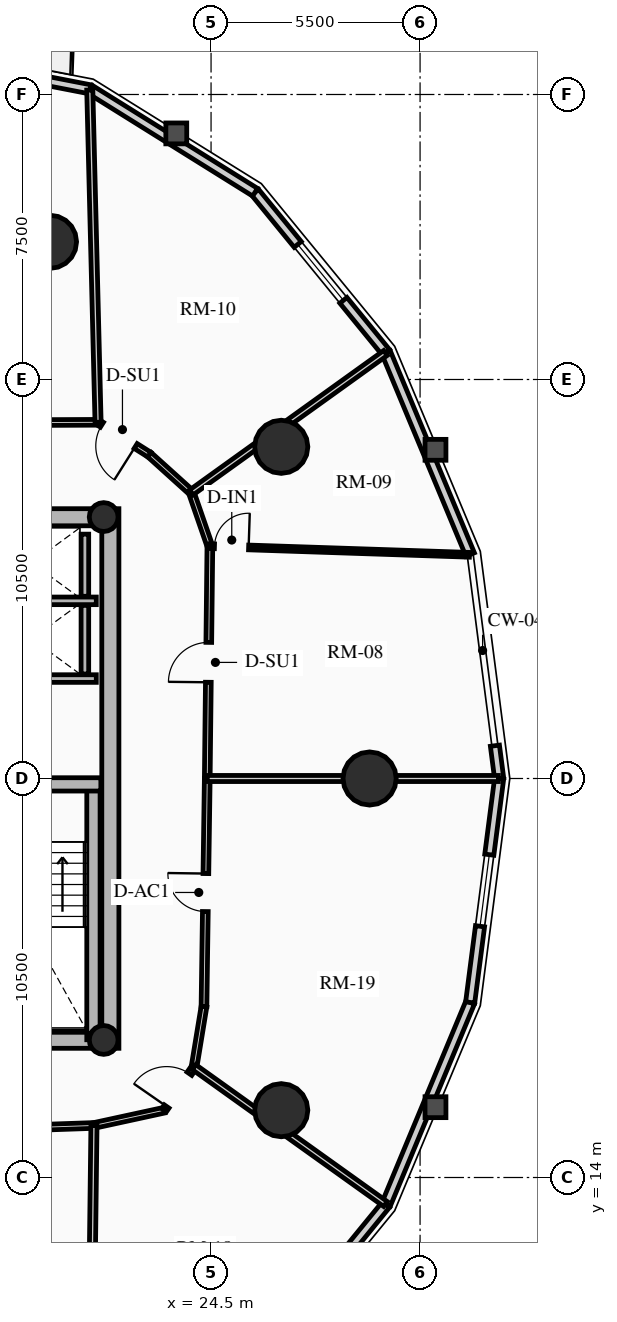
"""IFC4 building model, lengths in metres.
Left out: names, types, materials, properties, quantities, classifications, styles, units other than length and angle.
Written with IfcOpenShell. Run it as: python <this file> out.ifc"""

import sys

from ifc_helpers import new_model, si_unit, direction, frame, frame_2d, origin, origin_2d, place, context, subcontext, project, spatial, rectangle, circle, hollow_circle, extrude, source, transform, mapped, element, fill, save


model = new_model("IFC4")
c1 = context("Model", 3, precision=1e-05, world=origin(), true_north=direction((0.0, 1.0)))
c2 = subcontext(c1, "Body", "Model", "MODEL_VIEW")
j1 = project(units=[si_unit("LENGTHUNIT", "METRE"), si_unit("PLANEANGLEUNIT", "RADIAN")], contexts=[c1])
p1 = place(None, origin())
s1 = spatial("IfcSite", under=j1, at=p1, CompositionType="ELEMENT")
p2 = place(p1, origin())
s2 = spatial("IfcBuilding", under=s1, at=p2, CompositionType="ELEMENT")
p3 = place(p2, frame((0.0, 0.0, 78.88)))
s3 = spatial("IfcBuildingStorey", under=s2, at=p3, CompositionType="ELEMENT", Elevation=78.88)
p4 = place(p3, frame((21.85, 17.4, 0.0), z_axis=(0.0, 0.0, 1.0), x_axis=(0.0, 1.0, 0.0)))
e1 = element("IfcWall", 1, at=p4, inside=s3, PredefinedType="SHEAR", context=c2, shape_type="SweptSolid", body=[
    extrude(rectangle(XDim=14.2, YDim=0.45, at=frame_2d((7.1, 0.0))), origin(), (0.0, 0.0, 1.0), 2.91),
])
p5 = place(p3, frame((11.15, 17.625, 0.0), z_axis=(0.0, 0.0, 1.0), x_axis=(1.0, 0.0, 0.0)))
e2 = element("IfcWall", 2, at=p5, inside=s3, PredefinedType="SHEAR", context=c2, shape_type="SweptSolid", body=[
    extrude(rectangle(XDim=10.7, YDim=0.45, at=frame_2d((5.35, 0.0))), origin(), (0.0, 0.0, 1.0), 2.91),
])
m1 = source(origin(), c2, "Body", "SweptSolid", [
    extrude(rectangle(XDim=1.5, YDim=2.02, at=frame_2d((0.75, 1.01))), frame((0.0, 0.235, 0.0), z_axis=(0.0, -1.0, 0.0), x_axis=(1.0, 0.0, 0.0)), (0.0, 0.0, 1.0), 0.47),
])
p6 = place(p5, frame((5.45, 0.0, 0.0)))
e3 = element("IfcOpeningElement", 3, at=p6, cuts=e2, PredefinedType="OPENING", context=c2, shape_type="MappedRepresentation", body=[
    mapped(m1, transform((0.0, 0.0, 0.0), x_axis=(1.0, 0.0, 0.0), y_axis=(0.0, 1.0, 0.0), z_axis=(0.0, 0.0, 1.0), scale=1.0)),
])
p7 = place(p3, frame((11.15, 31.375, 0.0), z_axis=(0.0, 0.0, 1.0), x_axis=(1.0, 0.0, 0.0)))
e4 = element("IfcWall", 4, at=p7, inside=s3, PredefinedType="SHEAR", context=c2, shape_type="SweptSolid", body=[
    extrude(rectangle(XDim=10.7, YDim=0.45, at=frame_2d((5.35, 0.0))), origin(), (0.0, 0.0, 1.0), 2.91),
])
p8 = place(p7, frame((4.6, 0.0, 0.0)))
e5 = element("IfcOpeningElement", 5, at=p8, cuts=e4, PredefinedType="OPENING", context=c2, shape_type="MappedRepresentation", body=[
    mapped(m1, transform((0.0, 0.0, 0.0), x_axis=(1.0, 0.0, 0.0), y_axis=(0.0, 1.0, 0.0), z_axis=(0.0, 0.0, 1.0), scale=1.0)),
])
p9 = place(p3, frame((21.405, 17.625, 0.0), z_axis=(0.0, 0.0, 1.0), x_axis=(0.0, 1.0, 0.0)))
e6 = element("IfcWall", 6, at=p9, inside=s3, PredefinedType="SHEAR", context=c2, shape_type="SweptSolid", body=[
    extrude(rectangle(XDim=6.72, YDim=0.35, at=frame_2d((3.36, 0.0))), origin(), (0.0, 0.0, 1.0), 2.91),
])
p10 = place(p3, frame((18.315, 24.345, 0.0), z_axis=(0.0, 0.0, 1.0), x_axis=(1.0, 0.0, 0.0)))
e7 = element("IfcWall", 7, at=p10, inside=s3, PredefinedType="SHEAR", context=c2, shape_type="SweptSolid", body=[
    extrude(rectangle(XDim=3.285, YDim=0.35, at=frame_2d((1.643, 0.0))), origin(), (0.0, 0.0, 1.0), 2.91),
])
for number, where, z_axis, x_axis in (
    (8, (21.675, 17.62, 0.0), (0.0, 0.0, 1.0), (1.0, 0.0, 0.0)),
    (9, (21.675, 31.38, 0.0), (0.0, 0.0, 1.0), (1.0, 0.0, 0.0)),
):
    element("IfcColumn", number, at=place(p3, frame(where, z_axis=z_axis, x_axis=x_axis)), inside=s3, PredefinedType="COLUMN", context=c2, shape_type="SweptSolid", body=[
        extrude(hollow_circle(Radius=0.38, WallThickness=0.032, at=origin_2d()), origin(), (0.0, 0.0, 1.0), 2.91),
    ])
for number, where, z_axis, x_axis in (
    (10, (28.672, 24.5, 0.0), (0.0, 0.0, 1.0), (1.0, 0.0, 0.0)),
    (11, (26.347, 33.229, 0.0), (0.0, 0.0, 1.0), (1.0, 0.0, 0.0)),
    (12, (20.261, 38.623, 0.0), (0.0, 0.0, 1.0), (1.0, 0.0, 0.0)),
    (13, (26.347, 15.771, 0.0), (0.0, 0.0, 1.0), (1.0, 0.0, 0.0)),
):
    element("IfcColumn", number, at=place(p3, frame(where, z_axis=z_axis, x_axis=x_axis)), inside=s3, PredefinedType="USERDEFINED", context=c2, shape_type="SweptSolid", body=[
        extrude(circle(Radius=0.7, at=origin_2d()), origin(), (0.0, 0.0, 1.0), 2.91),
    ])
p11 = place(p3, frame((31.969, 25.363, 0.0), z_axis=(0.0, 0.0, 1.0), x_axis=(0.128523364007, -0.991706481225, 0.0)))
e14 = element("IfcWall", 14, at=p11, inside=s3, PredefinedType="SOLIDWALL", context=c2, shape_type="SweptSolid", body=[
    extrude(rectangle(XDim=0.87, YDim=0.24, at=frame_2d((0.435, 0.0))), origin(), (0.0, 0.0, 1.0), 2.655),
])
p12 = place(p3, frame((29.105, 35.709, 0.0), z_axis=(0.0, 0.0, 1.0), x_axis=(0.384344417632, -0.923189779317, 0.0)))
e15 = element("IfcWall", 15, at=p12, inside=s3, PredefinedType="SOLIDWALL", context=c2, shape_type="SweptSolid", body=[
    extrude(rectangle(XDim=5.758, YDim=0.24, at=frame_2d((2.879, 0.0))), origin(), (0.0, 0.0, 1.0), 2.179),
])
p13 = place(p3, frame((25.658, 39.928, 0.0), z_axis=(0.0, 0.0, 1.0), x_axis=(0.632700781152, -0.77439635945, 0.0)))
e16 = element("IfcWall", 16, at=p13, inside=s3, PredefinedType="SOLIDWALL", context=c2, shape_type="SweptSolid", body=[
    extrude(rectangle(XDim=5.448, YDim=0.24, at=frame_2d((2.724, 0.0))), origin(), (0.0, 0.0, 1.0), 2.179),
])
m2 = source(origin(), c2, "Body", "SweptSolid", [
    extrude(rectangle(XDim=1.9, YDim=1.35, at=frame_2d((0.95, 0.675))), frame((0.0, 0.13, 0.0), z_axis=(0.0, -1.0, 0.0), x_axis=(1.0, 0.0, 0.0)), (0.0, 0.0, 1.0), 0.26),
])
p14 = place(p13, frame((1.774, 0.0, 0.65)))
e17 = element("IfcOpeningElement", 17, at=p14, cuts=e16, PredefinedType="OPENING", context=c2, shape_type="MappedRepresentation", body=[
    mapped(m2, transform((0.0, 0.0, 0.0), x_axis=(1.0, 0.0, 0.0), y_axis=(0.0, 1.0, 0.0), z_axis=(0.0, 0.0, 1.0), scale=1.0)),
])
p15 = place(p3, frame((21.315, 42.637, 0.0), z_axis=(0.0, 0.0, 1.0), x_axis=(0.848520380187, -0.529162701263, 0.0)))
e18 = element("IfcWall", 18, at=p15, inside=s3, PredefinedType="SOLIDWALL", context=c2, shape_type="SweptSolid", body=[
    extrude(rectangle(XDim=5.119, YDim=0.24, at=frame_2d((2.56, 0.0))), origin(), (0.0, 0.0, 1.0), 2.179),
])
p16 = place(p3, frame((16.5, 43.57, 0.0), z_axis=(0.0, 0.0, 1.0), x_axis=(0.981723785992, -0.190311344954, 0.0)))
e19 = element("IfcWall", 19, at=p16, inside=s3, PredefinedType="SOLIDWALL", context=c2, shape_type="SweptSolid", body=[
    extrude(rectangle(XDim=4.904, YDim=0.24, at=frame_2d((2.452, 0.0))), origin(), (0.0, 0.0, 1.0), 2.179),
])
m3 = source(origin(), c2, "Body", "SweptSolid", [
    extrude(rectangle(XDim=1.15, YDim=2.005, at=frame_2d((0.575, 1.002))), frame((0.0, 0.13, 0.0), z_axis=(0.0, -1.0, 0.0), x_axis=(1.0, 0.0, 0.0)), (0.0, 0.0, 1.0), 0.26),
])
p17 = place(p16, frame((1.877, 0.0, 0.0)))
e20 = element("IfcOpeningElement", 20, at=p17, cuts=e19, PredefinedType="OPENING", context=c2, shape_type="MappedRepresentation", body=[
    mapped(m3, transform((0.0, 0.0, 0.0), x_axis=(1.0, 0.0, 0.0), y_axis=(0.0, 1.0, 0.0), z_axis=(0.0, 0.0, 1.0), scale=1.0)),
])
p18 = place(p3, frame((29.105, 13.291, 0.0), z_axis=(0.0, 0.0, 1.0), x_axis=(-0.632700781152, -0.77439635945, 0.0)))
e21 = element("IfcWall", 21, at=p18, inside=s3, PredefinedType="SOLIDWALL", context=c2, shape_type="SweptSolid", body=[
    extrude(rectangle(XDim=5.448, YDim=0.24, at=frame_2d((2.724, 0.0))), origin(), (0.0, 0.0, 1.0), 2.179),
])
p19 = place(p18, frame((1.774, 0.0, 0.65)))
e22 = element("IfcOpeningElement", 22, at=p19, cuts=e21, PredefinedType="OPENING", context=c2, shape_type="MappedRepresentation", body=[
    mapped(m2, transform((0.0, 0.0, 0.0), x_axis=(1.0, 0.0, 0.0), y_axis=(0.0, 1.0, 0.0), z_axis=(0.0, 0.0, 1.0), scale=1.0)),
])
p20 = place(p3, frame((31.318, 18.607, 0.0), z_axis=(0.0, 0.0, 1.0), x_axis=(-0.384344417632, -0.923189779317, 0.0)))
e23 = element("IfcWall", 23, at=p20, inside=s3, PredefinedType="SOLIDWALL", context=c2, shape_type="SweptSolid", body=[
    extrude(rectangle(XDim=5.758, YDim=0.24, at=frame_2d((2.879, 0.0))), origin(), (0.0, 0.0, 1.0), 2.179),
])
p21 = place(p3, frame((32.081, 24.5, 0.0), z_axis=(0.0, 0.0, 1.0), x_axis=(-0.128351991996, -0.991728675672, 0.0)))
e24 = element("IfcWall", 24, at=p21, inside=s3, PredefinedType="SOLIDWALL", context=c2, shape_type="SweptSolid", body=[
    extrude(rectangle(XDim=5.942, YDim=0.24, at=frame_2d((2.971, 0.0))), origin(), (0.0, 0.0, 1.0), 2.179),
])
p22 = place(p21, frame((2.021, 0.0, 0.65)))
e25 = element("IfcOpeningElement", 25, at=p22, cuts=e24, PredefinedType="OPENING", context=c2, shape_type="MappedRepresentation", body=[
    mapped(m2, transform((0.0, 0.0, 0.0), x_axis=(1.0, 0.0, 0.0), y_axis=(0.0, 1.0, 0.0), z_axis=(0.0, 0.0, 1.0), scale=1.0)),
])
for number, where, z_axis, x_axis in (
    (26, (18.51, 27.13, 0.0), (0.0, 0.0, 1.0), (1.0, 0.0, 0.0)),
    (27, (18.51, 29.175, 0.0), (0.0, 0.0, 1.0), (1.0, 0.0, 0.0)),
):
    element("IfcWall", number, at=place(p3, frame(where, z_axis=z_axis, x_axis=x_axis)), inside=s3, PredefinedType="SHEAR", context=c2, shape_type="SweptSolid", body=[
        extrude(rectangle(XDim=2.97, YDim=0.2, at=frame_2d((1.485, 0.0))), origin(), (0.0, 0.0, 1.0), 2.91),
    ])
p23 = place(p3, frame((21.18, 27.25, 0.0), z_axis=(0.0, 0.0, 1.0), x_axis=(0.0, 1.0, 0.0)))
e28 = element("IfcWall", 28, at=p23, inside=s3, PredefinedType="SHEAR", context=c2, shape_type="SweptSolid", body=[
    extrude(rectangle(XDim=1.805, YDim=0.2, at=frame_2d((0.902, 0.0))), origin(), (0.0, 0.0, 1.0), 2.91),
])
p24 = place(p3, frame((21.18, 29.295, 0.0), z_axis=(0.0, 0.0, 1.0), x_axis=(0.0, 1.0, 0.0)))
e29 = element("IfcWall", 29, at=p24, inside=s3, PredefinedType="SHEAR", context=c2, shape_type="SweptSolid", body=[
    extrude(rectangle(XDim=1.635, YDim=0.2, at=frame_2d((0.817, 0.0))), origin(), (0.0, 0.0, 1.0), 2.91),
])
p25 = place(p3, frame((24.4, 24.5, 0.0), z_axis=(0.0, 0.0, 1.0), x_axis=(0.011299841544, 0.999936154752, 0.0)))
e30 = element("IfcWall", 30, at=p25, inside=s3, PredefinedType="PARTITIONING", context=c2, shape_type="SweptSolid", body=[
    extrude(rectangle(XDim=6.115, YDim=0.15, at=frame_2d((3.057, 0.0))), origin(), (0.0, 0.0, 1.0), 2.225),
])
m4 = source(origin(), c2, "Body", "SweptSolid", [
    extrude(rectangle(XDim=1.05, YDim=2.015, at=frame_2d((0.525, 1.007))), frame((0.0, 0.085, 0.0), z_axis=(0.0, -1.0, 0.0), x_axis=(1.0, 0.0, 0.0)), (0.0, 0.0, 1.0), 0.17),
])
p26 = place(p25, frame((2.532, 0.0, 0.0)))
e31 = element("IfcOpeningElement", 31, at=p26, cuts=e30, PredefinedType="OPENING", context=c2, shape_type="MappedRepresentation", body=[
    mapped(m4, transform((0.0, 0.0, 0.0), x_axis=(1.0, 0.0, 0.0), y_axis=(0.0, 1.0, 0.0), z_axis=(0.0, 0.0, 1.0), scale=1.0)),
])
p27 = place(p3, frame((24.469, 30.614, 0.0), z_axis=(0.0, 0.0, 1.0), x_axis=(-0.327228335485, 0.944945298129, 0.0)))
e32 = element("IfcWall", 32, at=p27, inside=s3, PredefinedType="PARTITIONING", context=c2, shape_type="SweptSolid", body=[
    extrude(rectangle(XDim=1.495, YDim=0.15, at=frame_2d((0.748, 0.0))), origin(), (0.0, 0.0, 1.0), 2.225),
])
p28 = place(p3, frame((23.98, 32.027, 0.0), z_axis=(0.0, 0.0, 1.0), x_axis=(-0.742353224332, 0.670008724065, 0.0)))
e33 = element("IfcWall", 33, at=p28, inside=s3, PredefinedType="PARTITIONING", context=c2, shape_type="SweptSolid", body=[
    extrude(rectangle(XDim=1.485, YDim=0.15, at=frame_2d((0.742, 0.0))), origin(), (0.0, 0.0, 1.0), 2.225),
])
p29 = place(p3, frame((22.877, 33.022, 0.0), z_axis=(0.0, 0.0, 1.0), x_axis=(-0.845895608855, 0.533348496689, 0.0)))
e34 = element("IfcWall", 34, at=p29, inside=s3, PredefinedType="PARTITIONING", context=c2, shape_type="SweptSolid", body=[
    extrude(rectangle(XDim=1.597, YDim=0.15, at=frame_2d((0.798, 0.0))), origin(), (0.0, 0.0, 1.0), 2.225),
])
p30 = place(p29, frame((0.427, 0.0, 0.0)))
e35 = element("IfcOpeningElement", 35, at=p30, cuts=e34, PredefinedType="OPENING", context=c2, shape_type="MappedRepresentation", body=[
    mapped(m4, transform((0.0, 0.0, 0.0), x_axis=(1.0, 0.0, 0.0), y_axis=(0.0, 1.0, 0.0), z_axis=(0.0, 0.0, 1.0), scale=1.0)),
])
p31 = place(p3, frame((21.527, 33.873, 0.0), z_axis=(0.0, 0.0, 1.0), x_axis=(-0.999991838845, -0.004040079574, 0.0)))
e36 = element("IfcWall", 36, at=p31, inside=s3, PredefinedType="PARTITIONING", context=c2, shape_type="SweptSolid", body=[
    extrude(rectangle(XDim=3.384, YDim=0.15, at=frame_2d((1.692, 0.0))), origin(), (0.0, 0.0, 1.0), 2.225),
])
p32 = place(p3, frame((14.781, 15.141, 0.0), z_axis=(0.0, 0.0, 1.0), x_axis=(0.999407918707, 0.034406569513, 0.0)))
e37 = element("IfcWall", 37, at=p32, inside=s3, PredefinedType="PARTITIONING", context=c2, shape_type="SweptSolid", body=[
    extrude(rectangle(XDim=6.642, YDim=0.15, at=frame_2d((3.321, 0.0))), origin(), (0.0, 0.0, 1.0), 2.225),
])
p33 = place(p32, frame((2.796, 0.0, 0.0)))
e38 = element("IfcOpeningElement", 38, at=p33, cuts=e37, PredefinedType="OPENING", context=c2, shape_type="MappedRepresentation", body=[
    mapped(m4, transform((0.0, 0.0, 0.0), x_axis=(1.0, 0.0, 0.0), y_axis=(0.0, 1.0, 0.0), z_axis=(0.0, 0.0, 1.0), scale=1.0)),
])
p34 = place(p3, frame((21.419, 15.369, 0.0), z_axis=(0.0, 0.0, 1.0), x_axis=(0.977192701953, 0.212354475464, 0.0)))
e39 = element("IfcWall", 39, at=p34, inside=s3, PredefinedType="PARTITIONING", context=c2, shape_type="SweptSolid", body=[
    extrude(rectangle(XDim=1.888, YDim=0.15, at=frame_2d((0.944, 0.0))), origin(), (0.0, 0.0, 1.0), 2.225),
])
p35 = place(p3, frame((23.263, 15.77, 0.0), z_axis=(0.0, 0.0, 1.0), x_axis=(0.570743456919, 0.821128434768, 0.0)))
e40 = element("IfcWall", 40, at=p35, inside=s3, PredefinedType="PARTITIONING", context=c2, shape_type="SweptSolid", body=[
    extrude(rectangle(XDim=1.382, YDim=0.15, at=frame_2d((0.691, 0.0))), origin(), (0.0, 0.0, 1.0), 2.225),
])
p36 = place(p35, frame((0.12, 0.0, 0.0)))
e41 = element("IfcOpeningElement", 41, at=p36, cuts=e40, PredefinedType="OPENING", context=c2, shape_type="MappedRepresentation", body=[
    mapped(m4, transform((0.0, 0.0, 0.0), x_axis=(1.0, 0.0, 0.0), y_axis=(0.0, 1.0, 0.0), z_axis=(0.0, 0.0, 1.0), scale=1.0)),
])
p37 = place(p3, frame((24.052, 16.905, 0.0), z_axis=(0.0, 0.0, 1.0), x_axis=(0.162091534225, 0.986775726562, 0.0)))
e42 = element("IfcWall", 42, at=p37, inside=s3, PredefinedType="PARTITIONING", context=c2, shape_type="SweptSolid", body=[
    extrude(rectangle(XDim=1.613, YDim=0.15, at=frame_2d((0.807, 0.0))), origin(), (0.0, 0.0, 1.0), 2.225),
])
p38 = place(p3, frame((24.313, 18.496, 0.0), z_axis=(0.0, 0.0, 1.0), x_axis=(0.014394019188, 0.999896400739, 0.0)))
e43 = element("IfcWall", 43, at=p38, inside=s3, PredefinedType="PARTITIONING", context=c2, shape_type="SweptSolid", body=[
    extrude(rectangle(XDim=6.004, YDim=0.15, at=frame_2d((3.002, 0.0))), origin(), (0.0, 0.0, 1.0), 2.655),
])
m5 = source(origin(), c2, "Body", "SweptSolid", [
    extrude(rectangle(XDim=1.0, YDim=2.015, at=frame_2d((0.5, 1.007))), frame((0.0, 0.085, 0.0), z_axis=(0.0, -1.0, 0.0), x_axis=(1.0, 0.0, 0.0)), (0.0, 0.0, 1.0), 0.17),
])
p39 = place(p38, frame((2.502, 0.0, 0.0)))
e44 = element("IfcOpeningElement", 44, at=p39, cuts=e43, PredefinedType="OPENING", context=c2, shape_type="MappedRepresentation", body=[
    mapped(m5, transform((0.0, 0.0, 0.0), x_axis=(1.0, 0.0, 0.0), y_axis=(0.0, 1.0, 0.0), z_axis=(0.0, 0.0, 1.0), scale=1.0)),
])
p40 = place(p3, frame((24.4, 24.5, 0.0), z_axis=(0.0, 0.0, 1.0), x_axis=(1.0, 0.0, 0.0)))
e45 = element("IfcWall", 45, at=p40, inside=s3, PredefinedType="PARTITIONING", context=c2, shape_type="SweptSolid", body=[
    extrude(rectangle(XDim=7.661, YDim=0.16, at=frame_2d((3.831, 0.0))), origin(), (0.0, 0.0, 1.0), 2.179),
])
p41 = place(p3, frame((23.98, 32.027, 0.0), z_axis=(0.0, 0.0, 1.0), x_axis=(0.812162479031, 0.58343132214, 0.0)))
e46 = element("IfcWall", 46, at=p41, inside=s3, PredefinedType="PARTITIONING", context=c2, shape_type="SweptSolid", body=[
    extrude(rectangle(XDim=6.291, YDim=0.16, at=frame_2d((3.146, 0.0))), origin(), (0.0, 0.0, 1.0), 2.179),
])
p42 = place(p3, frame((21.527, 33.873, 0.0), z_axis=(0.0, 0.0, 1.0), x_axis=(-0.024952442794, 0.999688639327, 0.0)))
e47 = element("IfcWall", 47, at=p42, inside=s3, PredefinedType="PARTITIONING", context=c2, shape_type="SweptSolid", body=[
    extrude(rectangle(XDim=8.747, YDim=0.16, at=frame_2d((4.374, 0.0))), origin(), (0.0, 0.0, 1.0), 2.179),
])
p43 = place(p3, frame((21.419, 15.369, 0.0), z_axis=(0.0, 0.0, 1.0), x_axis=(-0.012251185903, -0.999924951406, 0.0)))
e48 = element("IfcWall", 48, at=p43, inside=s3, PredefinedType="PARTITIONING", context=c2, shape_type="SweptSolid", body=[
    extrude(rectangle(XDim=8.988, YDim=0.16, at=frame_2d((4.494, 0.0))), origin(), (0.0, 0.0, 1.0), 2.179),
])
p44 = place(p3, frame((24.052, 16.905, 0.0), z_axis=(0.0, 0.0, 1.0), x_axis=(0.813437670746, -0.581652091727, 0.0)))
e49 = element("IfcWall", 49, at=p44, inside=s3, PredefinedType="PARTITIONING", context=c2, shape_type="SweptSolid", body=[
    extrude(rectangle(XDim=6.192, YDim=0.16, at=frame_2d((3.096, 0.0))), origin(), (0.0, 0.0, 1.0), 2.179),
])
p45 = place(p3, frame((24.469, 30.614, 0.0), z_axis=(0.0, 0.0, 1.0), x_axis=(0.999446768925, -0.033258924898, 0.0)))
e50 = element("IfcWall", 50, at=p45, inside=s3, PredefinedType="PARTITIONING", context=c2, shape_type="SweptSolid", body=[
    extrude(rectangle(XDim=6.834, YDim=0.125, at=frame_2d((3.417, 0.0))), origin(), (0.0, 0.0, 1.0), 2.179),
])
m6 = source(origin(), c2, "Body", "SweptSolid", [
    extrude(rectangle(XDim=0.9, YDim=2.005, at=frame_2d((0.45, 1.002))), frame((0.0, 0.073, 0.0), z_axis=(0.0, -1.0, 0.0), x_axis=(1.0, 0.0, 0.0)), (0.0, 0.0, 1.0), 0.145),
])
p46 = place(p45, frame((0.12, 0.0, 0.0)))
e51 = element("IfcOpeningElement", 51, at=p46, cuts=e50, PredefinedType="OPENING", context=c2, shape_type="MappedRepresentation", body=[
    mapped(m6, transform((0.0, 0.0, 0.0), x_axis=(1.0, 0.0, 0.0), y_axis=(0.0, 1.0, 0.0), z_axis=(0.0, 0.0, 1.0), scale=1.0)),
])
m7 = source(origin(), c2, "Body", "SweptSolid", [
    extrude(rectangle(XDim=1.9, YDim=1.35, at=frame_2d((0.95, 0.675))), frame((0.0, 0.03, 0.0), z_axis=(0.0, -1.0, 0.0), x_axis=(1.0, 0.0, 0.0)), (0.0, 0.0, 1.0), 0.06),
])
p47 = place(p14, origin())
e52 = element("IfcWindow", 52, at=p47, inside=s3, PartitioningType="DOUBLE_PANEL_VERTICAL", PredefinedType="WINDOW", context=c2, shape_type="MappedRepresentation", body=[
    mapped(m7, transform((0.0, 0.0, 0.0), x_axis=(1.0, 0.0, 0.0), y_axis=(0.0, 1.0, 0.0), z_axis=(0.0, 0.0, 1.0), scale=1.0)),
])
fill(e17, e52)
p48 = place(p22, origin())
e53 = element("IfcWindow", 53, at=p48, inside=s3, PartitioningType="DOUBLE_PANEL_VERTICAL", PredefinedType="WINDOW", context=c2, shape_type="MappedRepresentation", body=[
    mapped(m7, transform((0.0, 0.0, 0.0), x_axis=(1.0, 0.0, 0.0), y_axis=(0.0, 1.0, 0.0), z_axis=(0.0, 0.0, 1.0), scale=1.0)),
])
fill(e25, e53)
m8 = source(origin(), c2, "Body", "SweptSolid", [
    extrude(rectangle(XDim=1.05, YDim=2.015, at=frame_2d((0.525, 1.007))), frame((0.0, 0.025, 0.0), z_axis=(0.0, -1.0, 0.0), x_axis=(1.0, 0.0, 0.0)), (0.0, 0.0, 1.0), 0.05),
])
p49 = place(p26, origin())
e54 = element("IfcDoor", 54, at=p49, inside=s3, OperationType="SINGLE_SWING_LEFT", PredefinedType="DOOR", context=c2, shape_type="MappedRepresentation", body=[
    mapped(m8, transform((0.0, 0.0, 0.0), x_axis=(1.0, 0.0, 0.0), y_axis=(0.0, 1.0, 0.0), z_axis=(0.0, 0.0, 1.0), scale=1.0)),
])
fill(e31, e54)
m9 = source(origin(), c2, "Body", "SweptSolid", [
    extrude(rectangle(XDim=0.9, YDim=2.005, at=frame_2d((0.45, 1.002))), frame((0.0, 0.025, 0.0), z_axis=(0.0, -1.0, 0.0), x_axis=(1.0, 0.0, 0.0)), (0.0, 0.0, 1.0), 0.05),
])
p50 = place(p46, origin())
e55 = element("IfcDoor", 55, at=p50, inside=s3, OperationType="SINGLE_SWING_RIGHT", PredefinedType="DOOR", context=c2, shape_type="MappedRepresentation", body=[
    mapped(m9, transform((0.0, 0.0, 0.0), x_axis=(1.0, 0.0, 0.0), y_axis=(0.0, 1.0, 0.0), z_axis=(0.0, 0.0, 1.0), scale=1.0)),
])
fill(e51, e55)
p51 = place(p30, origin())
e56 = element("IfcDoor", 56, at=p51, inside=s3, OperationType="SINGLE_SWING_LEFT", PredefinedType="DOOR", context=c2, shape_type="MappedRepresentation", body=[
    mapped(m8, transform((0.0, 0.0, 0.0), x_axis=(1.0, 0.0, 0.0), y_axis=(0.0, 1.0, 0.0), z_axis=(0.0, 0.0, 1.0), scale=1.0)),
])
fill(e35, e56)
p52 = place(p36, origin())
e57 = element("IfcDoor", 57, at=p52, inside=s3, OperationType="SINGLE_SWING_LEFT", PredefinedType="DOOR", context=c2, shape_type="MappedRepresentation", body=[
    mapped(m8, transform((0.0, 0.0, 0.0), x_axis=(1.0, 0.0, 0.0), y_axis=(0.0, 1.0, 0.0), z_axis=(0.0, 0.0, 1.0), scale=1.0)),
])
fill(e41, e57)
m10 = source(origin(), c2, "Body", "SweptSolid", [
    extrude(rectangle(XDim=1.0, YDim=2.015, at=frame_2d((0.5, 1.007))), frame((0.0, 0.025, 0.0), z_axis=(0.0, -1.0, 0.0), x_axis=(1.0, 0.0, 0.0)), (0.0, 0.0, 1.0), 0.05),
])
p53 = place(p39, origin())
e58 = element("IfcDoor", 58, at=p53, inside=s3, OperationType="SINGLE_SWING_RIGHT", PredefinedType="DOOR", context=c2, shape_type="MappedRepresentation", body=[
    mapped(m10, transform((0.0, 0.0, 0.0), x_axis=(1.0, 0.0, 0.0), y_axis=(0.0, 1.0, 0.0), z_axis=(0.0, 0.0, 1.0), scale=1.0)),
])
fill(e44, e58)
save(model, sys.argv[1])
